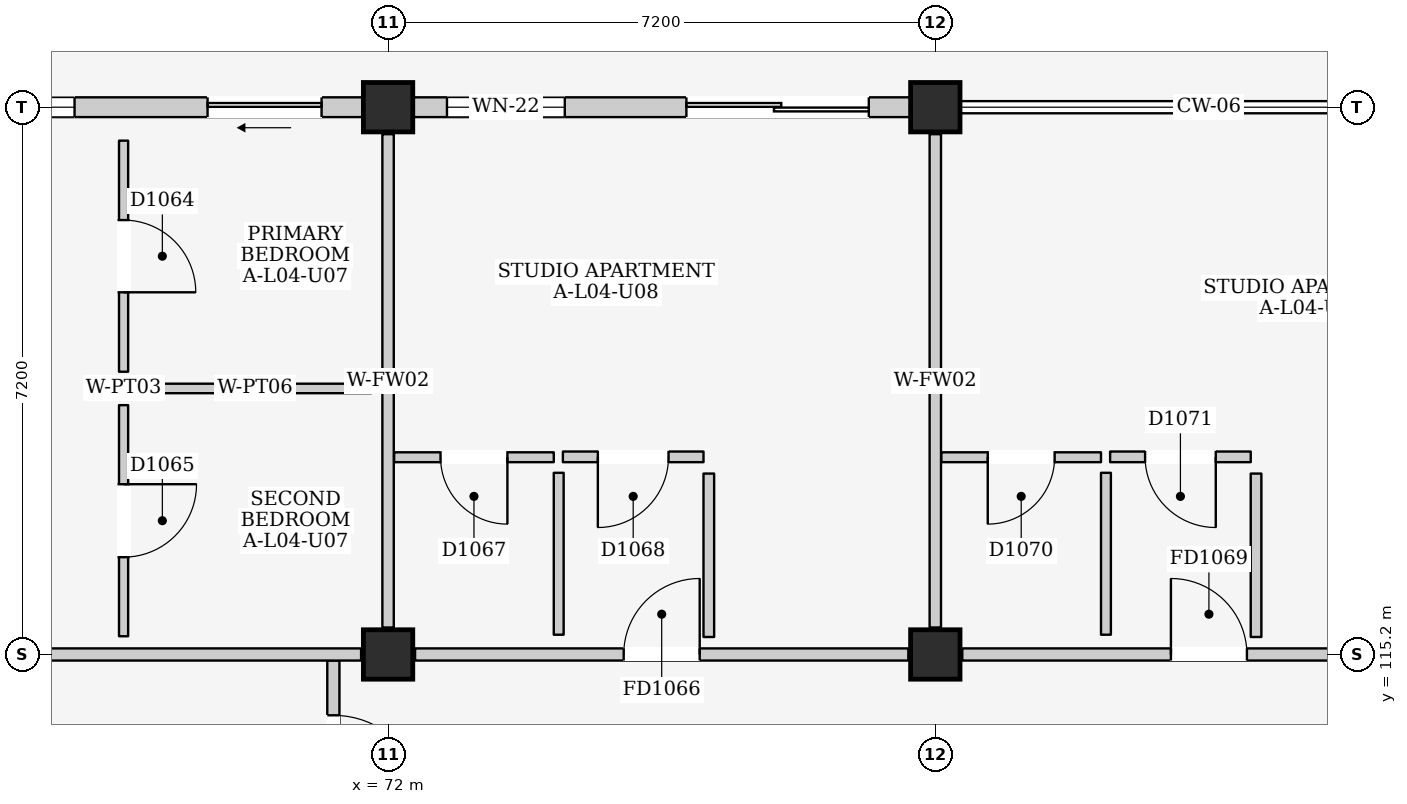
"""IFC4 building model, lengths in metres.
Left out: names, types, materials, properties, quantities, classifications, styles, units other than length and angle.
Written with IfcOpenShell. Run it as: python <this file> out.ifc"""

import sys

from ifc_helpers import new_model, si_unit, direction, frame, frame_2d, origin, origin_2d, place, context, subcontext, project, spatial, rectangle, extrude, element, fill, save


model = new_model("IFC4")
c1 = context("Model", 3, precision=1e-05, world=origin(), true_north=direction((0.0, 1.0)))
c2 = subcontext(c1, "Body", "Model", "MODEL_VIEW")
j1 = project(units=[si_unit("LENGTHUNIT", "METRE"), si_unit("PLANEANGLEUNIT", "RADIAN")], contexts=[c1])
p1 = place(None, origin())
s1 = spatial("IfcSite", under=j1, at=p1, CompositionType="ELEMENT")
p2 = place(p1, origin())
s2 = spatial("IfcBuilding", under=s1, at=p2, CompositionType="ELEMENT")
p3 = place(p2, frame((0.0, 0.0, 15.4)))
s3 = spatial("IfcBuildingStorey", under=s2, at=p3, CompositionType="ELEMENT", Elevation=15.4)
for number, where, z_axis, x_axis in (
    (1, (72.0, 115.2, 0.0), (0.0, 0.0, 1.0), (1.0, 0.0, 0.0)),
    (2, (72.0, 122.4, 0.0), (0.0, 0.0, 1.0), (1.0, 0.0, 0.0)),
    (3, (79.2, 115.2, 0.0), (0.0, 0.0, 1.0), (1.0, 0.0, 0.0)),
    (4, (79.2, 122.4, 0.0), (0.0, 0.0, 1.0), (1.0, 0.0, 0.0)),
):
    element("IfcColumn", number, at=place(p3, frame(where, z_axis=z_axis, x_axis=x_axis)), inside=s3, PredefinedType="COLUMN", context=c2, shape_type="SweptSolid", body=[
        extrude(rectangle(XDim=0.65, YDim=0.65, at=origin_2d()), origin(), (0.0, 0.0, 1.0), 3.2),
    ])
p4 = place(p3, frame((65.125, 122.4, 0.0), z_axis=(0.0, 0.0, 1.0), x_axis=(1.0, 0.0, 0.0)))
e5 = element("IfcWall", 5, at=p4, inside=s3, PredefinedType="ELEMENTEDWALL", context=c2, shape_type="SweptSolid", body=[
    extrude(rectangle(XDim=6.55, YDim=0.26, at=frame_2d((3.275, 0.0))), origin(), (0.0, 0.0, 1.0), 2.43),
])
p5 = place(p4, frame((4.5, 0.0, 0.0)))
e6 = element("IfcOpeningElement", 6, at=p5, cuts=e5, PredefinedType="OPENING", context=c2, shape_type="SweptSolid", body=[
    extrude(rectangle(XDim=1.5, YDim=2.12, at=frame_2d((0.75, 1.06))), frame((0.0, 0.145, 0.0), z_axis=(0.0, -1.0, 0.0), x_axis=(1.0, 0.0, 0.0)), (0.0, 0.0, 1.0), 0.29),
])
p6 = place(p4, frame((0.45, 0.0, 0.71)))
e7 = element("IfcOpeningElement", 7, at=p6, cuts=e5, PredefinedType="OPENING", context=c2, shape_type="SweptSolid", body=[
    extrude(rectangle(XDim=2.3, YDim=1.6, at=frame_2d((1.15, 0.8))), frame((0.0, 0.145, 0.0), z_axis=(0.0, -1.0, 0.0), x_axis=(1.0, 0.0, 0.0)), (0.0, 0.0, 1.0), 0.29),
])
p7 = place(p3, frame((72.325, 122.4, 0.0), z_axis=(0.0, 0.0, 1.0), x_axis=(1.0, 0.0, 0.0)))
e8 = element("IfcWall", 8, at=p7, inside=s3, PredefinedType="ELEMENTEDWALL", context=c2, shape_type="SweptSolid", body=[
    extrude(rectangle(XDim=6.55, YDim=0.26, at=frame_2d((3.275, 0.0))), origin(), (0.0, 0.0, 1.0), 2.43),
])
p8 = place(p7, frame((3.6, 0.0, 0.0)))
e9 = element("IfcOpeningElement", 9, at=p8, cuts=e8, PredefinedType="OPENING", context=c2, shape_type="SweptSolid", body=[
    extrude(rectangle(XDim=2.4, YDim=2.12, at=frame_2d((1.2, 1.06))), frame((0.0, 0.145, 0.0), z_axis=(0.0, -1.0, 0.0), x_axis=(1.0, 0.0, 0.0)), (0.0, 0.0, 1.0), 0.29),
])
p9 = place(p7, frame((0.45, 0.0, 0.86)))
e10 = element("IfcOpeningElement", 10, at=p9, cuts=e8, PredefinedType="OPENING", context=c2, shape_type="SweptSolid", body=[
    extrude(rectangle(XDim=1.55, YDim=1.45, at=frame_2d((0.775, 0.725))), frame((0.0, 0.145, 0.0), z_axis=(0.0, -1.0, 0.0), x_axis=(1.0, 0.0, 0.0)), (0.0, 0.0, 1.0), 0.29),
])
p10 = place(p3, frame((71.28, 110.8, 0.0), z_axis=(0.0, 0.0, 1.0), x_axis=(0.0, 1.0, 0.0)))
e11 = element("IfcWall", 11, at=p10, inside=s3, PredefinedType="PARTITIONING", context=c2, shape_type="SweptSolid", body=[
    extrude(rectangle(XDim=4.32, YDim=0.16, at=frame_2d((2.16, 0.0))), origin(), (0.0, 0.0, 1.0), 2.95),
])
p11 = place(p10, frame((2.4, 0.0, 0.0)))
e12 = element("IfcOpeningElement", 12, at=p11, cuts=e11, PredefinedType="OPENING", context=c2, shape_type="SweptSolid", body=[
    extrude(rectangle(XDim=1.2, YDim=2.2, at=frame_2d((0.6, 1.1))), frame((0.0, 0.095, 0.0), z_axis=(0.0, -1.0, 0.0), x_axis=(1.0, 0.0, 0.0)), (0.0, 0.0, 1.0), 0.19),
])
p12 = place(p3, frame((65.155, 115.2, 0.0), z_axis=(0.0, 0.0, 1.0), x_axis=(1.0, 0.0, 0.0)))
e13 = element("IfcWall", 13, at=p12, inside=s3, PredefinedType="PARTITIONING", context=c2, shape_type="SweptSolid", body=[
    extrude(rectangle(XDim=6.49, YDim=0.16, at=frame_2d((3.245, 0.0))), origin(), (0.0, 0.0, 1.0), 2.285),
])
p13 = place(p3, frame((72.0, 115.555, 0.0), z_axis=(0.0, 0.0, 1.0), x_axis=(0.0, 1.0, 0.0)))
e14 = element("IfcWall", 14, at=p13, inside=s3, PredefinedType="PARTITIONING", context=c2, shape_type="SweptSolid", body=[
    extrude(rectangle(XDim=6.49, YDim=0.15, at=frame_2d((3.245, 0.0))), origin(), (0.0, 0.0, 1.0), 2.385),
])
p14 = place(p3, frame((68.52, 118.92, 0.0), z_axis=(0.0, 0.0, 1.0), x_axis=(0.0, 1.0, 0.0)))
e15 = element("IfcWall", 15, at=p14, inside=s3, PredefinedType="PARTITIONING", context=c2, shape_type="SweptSolid", body=[
    extrude(rectangle(XDim=3.04, YDim=0.12, at=frame_2d((1.52, 0.0))), origin(), (0.0, 0.0, 1.0), 2.95),
])
p15 = place(p14, frame((1.045, 0.0, 0.0)))
e16 = element("IfcOpeningElement", 16, at=p15, cuts=e15, PredefinedType="OPENING", context=c2, shape_type="SweptSolid", body=[
    extrude(rectangle(XDim=0.95, YDim=2.15, at=frame_2d((0.475, 1.075))), frame((0.0, 0.075, 0.0), z_axis=(0.0, -1.0, 0.0), x_axis=(1.0, 0.0, 0.0)), (0.0, 0.0, 1.0), 0.15),
])
p16 = place(p3, frame((68.72, 118.7, 0.0), z_axis=(0.0, 0.0, 1.0), x_axis=(1.0, 0.0, 0.0)))
e17 = element("IfcWall", 17, at=p16, inside=s3, PredefinedType="PARTITIONING", context=c2, shape_type="SweptSolid", body=[
    extrude(rectangle(XDim=3.06, YDim=0.125, at=frame_2d((1.53, 0.0))), origin(), (0.0, 0.0, 1.0), 2.95),
])
p17 = place(p3, frame((68.52, 115.44, 0.0), z_axis=(0.0, 0.0, 1.0), x_axis=(0.0, 1.0, 0.0)))
e18 = element("IfcWall", 18, at=p17, inside=s3, PredefinedType="PARTITIONING", context=c2, shape_type="SweptSolid", body=[
    extrude(rectangle(XDim=3.04, YDim=0.12, at=frame_2d((1.52, 0.0))), origin(), (0.0, 0.0, 1.0), 2.95),
])
p18 = place(p17, frame((1.04, 0.0, 0.0)))
e19 = element("IfcOpeningElement", 19, at=p18, cuts=e18, PredefinedType="OPENING", context=c2, shape_type="SweptSolid", body=[
    extrude(rectangle(XDim=0.96, YDim=2.15, at=frame_2d((0.48, 1.075))), frame((0.0, 0.075, 0.0), z_axis=(0.0, -1.0, 0.0), x_axis=(1.0, 0.0, 0.0)), (0.0, 0.0, 1.0), 0.15),
])
p19 = place(p3, frame((72.355, 115.2, 0.0), z_axis=(0.0, 0.0, 1.0), x_axis=(1.0, 0.0, 0.0)))
e20 = element("IfcWall", 20, at=p19, inside=s3, PredefinedType="PARTITIONING", context=c2, shape_type="SweptSolid", body=[
    extrude(rectangle(XDim=6.49, YDim=0.16, at=frame_2d((3.245, 0.0))), origin(), (0.0, 0.0, 1.0), 2.285),
])
p20 = place(p19, frame((2.745, 0.0, 0.0)))
e21 = element("IfcOpeningElement", 21, at=p20, cuts=e20, PredefinedType="OPENING", context=c2, shape_type="SweptSolid", body=[
    extrude(rectangle(XDim=1.0, YDim=2.15, at=frame_2d((0.5, 1.075))), frame((0.0, 0.095, 0.0), z_axis=(0.0, -1.0, 0.0), x_axis=(1.0, 0.0, 0.0)), (0.0, 0.0, 1.0), 0.19),
])
p21 = place(p3, frame((79.2, 115.555, 0.0), z_axis=(0.0, 0.0, 1.0), x_axis=(0.0, 1.0, 0.0)))
e22 = element("IfcWall", 22, at=p21, inside=s3, PredefinedType="PARTITIONING", context=c2, shape_type="SweptSolid", body=[
    extrude(rectangle(XDim=6.49, YDim=0.15, at=frame_2d((3.245, 0.0))), origin(), (0.0, 0.0, 1.0), 2.385),
])
p22 = place(p3, frame((72.08, 117.795, 0.0), z_axis=(0.0, 0.0, 1.0), x_axis=(1.0, 0.0, 0.0)))
e23 = element("IfcWall", 23, at=p22, inside=s3, PredefinedType="PARTITIONING", context=c2, shape_type="SweptSolid", body=[
    extrude(rectangle(XDim=2.1, YDim=0.13, at=frame_2d((1.05, 0.0))), origin(), (0.0, 0.0, 1.0), 2.95),
])
p23 = place(p22, frame((0.61, 0.0, 0.0)))
e24 = element("IfcOpeningElement", 24, at=p23, cuts=e23, PredefinedType="OPENING", context=c2, shape_type="SweptSolid", body=[
    extrude(rectangle(XDim=0.88, YDim=2.1, at=frame_2d((0.44, 1.05))), frame((0.0, 0.08, 0.0), z_axis=(0.0, -1.0, 0.0), x_axis=(1.0, 0.0, 0.0)), (0.0, 0.0, 1.0), 0.16),
])
p24 = place(p3, frame((74.245, 115.46, 0.0), z_axis=(0.0, 0.0, 1.0), x_axis=(0.0, 1.0, 0.0)))
e25 = element("IfcWall", 25, at=p24, inside=s3, PredefinedType="PARTITIONING", context=c2, shape_type="SweptSolid", body=[
    extrude(rectangle(XDim=2.13, YDim=0.13, at=frame_2d((1.065, 0.0))), origin(), (0.0, 0.0, 1.0), 2.95),
])
p25 = place(p3, frame((74.3, 117.8, 0.0), z_axis=(0.0, 0.0, 1.0), x_axis=(1.0, 0.0, 0.0)))
e26 = element("IfcWall", 26, at=p25, inside=s3, PredefinedType="PARTITIONING", context=c2, shape_type="SweptSolid", body=[
    extrude(rectangle(XDim=1.85, YDim=0.14, at=frame_2d((0.925, 0.0))), origin(), (0.0, 0.0, 1.0), 2.95),
])
p26 = place(p25, frame((0.46, 0.0, 0.0)))
e27 = element("IfcOpeningElement", 27, at=p26, cuts=e26, PredefinedType="OPENING", context=c2, shape_type="SweptSolid", body=[
    extrude(rectangle(XDim=0.93, YDim=2.14, at=frame_2d((0.465, 1.07))), frame((0.0, 0.085, 0.0), z_axis=(0.0, -1.0, 0.0), x_axis=(1.0, 0.0, 0.0)), (0.0, 0.0, 1.0), 0.17),
])
p27 = place(p3, frame((76.22, 115.43, 0.0), z_axis=(0.0, 0.0, 1.0), x_axis=(0.0, 1.0, 0.0)))
e28 = element("IfcWall", 28, at=p27, inside=s3, PredefinedType="PARTITIONING", context=c2, shape_type="SweptSolid", body=[
    extrude(rectangle(XDim=2.15, YDim=0.14, at=frame_2d((1.075, 0.0))), origin(), (0.0, 0.0, 1.0), 2.95),
])
p28 = place(p3, frame((79.555, 115.2, 0.0), z_axis=(0.0, 0.0, 1.0), x_axis=(1.0, 0.0, 0.0)))
e29 = element("IfcWall", 29, at=p28, inside=s3, PredefinedType="PARTITIONING", context=c2, shape_type="SweptSolid", body=[
    extrude(rectangle(XDim=6.49, YDim=0.16, at=frame_2d((3.245, 0.0))), origin(), (0.0, 0.0, 1.0), 2.285),
])
p29 = place(p28, frame((2.745, 0.0, 0.0)))
e30 = element("IfcOpeningElement", 30, at=p29, cuts=e29, PredefinedType="OPENING", context=c2, shape_type="SweptSolid", body=[
    extrude(rectangle(XDim=1.0, YDim=2.15, at=frame_2d((0.5, 1.075))), frame((0.0, 0.095, 0.0), z_axis=(0.0, -1.0, 0.0), x_axis=(1.0, 0.0, 0.0)), (0.0, 0.0, 1.0), 0.19),
])
p30 = place(p3, frame((79.28, 117.795, 0.0), z_axis=(0.0, 0.0, 1.0), x_axis=(1.0, 0.0, 0.0)))
e31 = element("IfcWall", 31, at=p30, inside=s3, PredefinedType="PARTITIONING", context=c2, shape_type="SweptSolid", body=[
    extrude(rectangle(XDim=2.1, YDim=0.13, at=frame_2d((1.05, 0.0))), origin(), (0.0, 0.0, 1.0), 2.95),
])
p31 = place(p30, frame((0.61, 0.0, 0.0)))
e32 = element("IfcOpeningElement", 32, at=p31, cuts=e31, PredefinedType="OPENING", context=c2, shape_type="SweptSolid", body=[
    extrude(rectangle(XDim=0.88, YDim=2.1, at=frame_2d((0.44, 1.05))), frame((0.0, 0.08, 0.0), z_axis=(0.0, -1.0, 0.0), x_axis=(1.0, 0.0, 0.0)), (0.0, 0.0, 1.0), 0.16),
])
p32 = place(p3, frame((81.445, 115.46, 0.0), z_axis=(0.0, 0.0, 1.0), x_axis=(0.0, 1.0, 0.0)))
e33 = element("IfcWall", 33, at=p32, inside=s3, PredefinedType="PARTITIONING", context=c2, shape_type="SweptSolid", body=[
    extrude(rectangle(XDim=2.13, YDim=0.13, at=frame_2d((1.065, 0.0))), origin(), (0.0, 0.0, 1.0), 2.95),
])
p33 = place(p3, frame((81.5, 117.8, 0.0), z_axis=(0.0, 0.0, 1.0), x_axis=(1.0, 0.0, 0.0)))
e34 = element("IfcWall", 34, at=p33, inside=s3, PredefinedType="PARTITIONING", context=c2, shape_type="SweptSolid", body=[
    extrude(rectangle(XDim=1.85, YDim=0.14, at=frame_2d((0.925, 0.0))), origin(), (0.0, 0.0, 1.0), 2.95),
])
p34 = place(p33, frame((0.46, 0.0, 0.0)))
e35 = element("IfcOpeningElement", 35, at=p34, cuts=e34, PredefinedType="OPENING", context=c2, shape_type="SweptSolid", body=[
    extrude(rectangle(XDim=0.93, YDim=2.14, at=frame_2d((0.465, 1.07))), frame((0.0, 0.085, 0.0), z_axis=(0.0, -1.0, 0.0), x_axis=(1.0, 0.0, 0.0)), (0.0, 0.0, 1.0), 0.17),
])
p35 = place(p3, frame((83.42, 115.43, 0.0), z_axis=(0.0, 0.0, 1.0), x_axis=(0.0, 1.0, 0.0)))
e36 = element("IfcWall", 36, at=p35, inside=s3, PredefinedType="PARTITIONING", context=c2, shape_type="SweptSolid", body=[
    extrude(rectangle(XDim=2.15, YDim=0.14, at=frame_2d((1.075, 0.0))), origin(), (0.0, 0.0, 1.0), 2.95),
])
p36 = place(p5, frame((1.5, 0.0, 0.0), z_axis=(0.0, 0.0, 1.0), x_axis=(-1.0, 0.0, 0.0)))
e37 = element("IfcDoor", 37, at=p36, inside=s3, OperationType="SLIDING_TO_LEFT", PredefinedType="DOOR", context=c2, shape_type="SweptSolid", body=[
    extrude(rectangle(XDim=1.5, YDim=2.12, at=frame_2d((0.75, 1.06))), frame((0.0, 0.025, 0.0), z_axis=(0.0, -1.0, 0.0), x_axis=(1.0, 0.0, 0.0)), (0.0, 0.0, 1.0), 0.05),
])
fill(e6, e37)
p37 = place(p6, origin())
e38 = element("IfcWindow", 38, at=p37, inside=s3, PartitioningType="TRIPLE_PANEL_VERTICAL", PredefinedType="WINDOW", context=c2, shape_type="SweptSolid", body=[
    extrude(rectangle(XDim=2.3, YDim=1.6, at=frame_2d((1.15, 0.8))), frame((0.0, 0.03, 0.0), z_axis=(0.0, -1.0, 0.0), x_axis=(1.0, 0.0, 0.0)), (0.0, 0.0, 1.0), 0.06),
])
fill(e7, e38)
p38 = place(p8, frame((2.4, 0.0, 0.0), z_axis=(0.0, 0.0, 1.0), x_axis=(-1.0, 0.0, 0.0)))
e39 = element("IfcDoor", 39, at=p38, inside=s3, OperationType="DOUBLE_DOOR_SLIDING", PredefinedType="DOOR", context=c2, shape_type="SweptSolid", body=[
    extrude(rectangle(XDim=2.4, YDim=2.12, at=frame_2d((1.2, 1.06))), frame((0.0, 0.025, 0.0), z_axis=(0.0, -1.0, 0.0), x_axis=(1.0, 0.0, 0.0)), (0.0, 0.0, 1.0), 0.05),
])
fill(e9, e39)
p39 = place(p9, origin())
e40 = element("IfcWindow", 40, at=p39, inside=s3, PartitioningType="DOUBLE_PANEL_VERTICAL", PredefinedType="WINDOW", context=c2, shape_type="SweptSolid", body=[
    extrude(rectangle(XDim=1.55, YDim=1.45, at=frame_2d((0.775, 0.725))), frame((0.0, 0.03, 0.0), z_axis=(0.0, -1.0, 0.0), x_axis=(1.0, 0.0, 0.0)), (0.0, 0.0, 1.0), 0.06),
])
fill(e10, e40)
p40 = place(p11, frame((1.2, 0.0, 0.0), z_axis=(0.0, 0.0, 1.0), x_axis=(-1.0, 0.0, 0.0)))
e41 = element("IfcDoor", 41, at=p40, inside=s3, OperationType="SINGLE_SWING_RIGHT", PredefinedType="DOOR", context=c2, shape_type="SweptSolid", body=[
    extrude(rectangle(XDim=1.2, YDim=2.2, at=frame_2d((0.6, 1.1))), frame((0.0, 0.025, 0.0), z_axis=(0.0, -1.0, 0.0), x_axis=(1.0, 0.0, 0.0)), (0.0, 0.0, 1.0), 0.05),
])
fill(e12, e41)
p41 = place(p15, frame((0.95, 0.0, 0.0), z_axis=(0.0, 0.0, 1.0), x_axis=(-1.0, 0.0, 0.0)))
e42 = element("IfcDoor", 42, at=p41, inside=s3, OperationType="SINGLE_SWING_RIGHT", PredefinedType="DOOR", context=c2, shape_type="SweptSolid", body=[
    extrude(rectangle(XDim=0.95, YDim=2.15, at=frame_2d((0.475, 1.075))), frame((0.0, 0.025, 0.0), z_axis=(0.0, -1.0, 0.0), x_axis=(1.0, 0.0, 0.0)), (0.0, 0.0, 1.0), 0.05),
])
fill(e16, e42)
p42 = place(p18, frame((0.96, 0.0, 0.0), z_axis=(0.0, 0.0, 1.0), x_axis=(-1.0, 0.0, 0.0)))
e43 = element("IfcDoor", 43, at=p42, inside=s3, OperationType="SINGLE_SWING_LEFT", PredefinedType="DOOR", context=c2, shape_type="SweptSolid", body=[
    extrude(rectangle(XDim=0.96, YDim=2.15, at=frame_2d((0.48, 1.075))), frame((0.0, 0.025, 0.0), z_axis=(0.0, -1.0, 0.0), x_axis=(1.0, 0.0, 0.0)), (0.0, 0.0, 1.0), 0.05),
])
fill(e19, e43)
p43 = place(p20, origin())
e44 = element("IfcDoor", 44, at=p43, inside=s3, OperationType="SINGLE_SWING_RIGHT", PredefinedType="DOOR", context=c2, shape_type="SweptSolid", body=[
    extrude(rectangle(XDim=1.0, YDim=2.15, at=frame_2d((0.5, 1.075))), frame((0.0, 0.025, 0.0), z_axis=(0.0, -1.0, 0.0), x_axis=(1.0, 0.0, 0.0)), (0.0, 0.0, 1.0), 0.05),
])
fill(e21, e44)
p44 = place(p23, frame((0.88, 0.0, 0.0), z_axis=(0.0, 0.0, 1.0), x_axis=(-1.0, 0.0, 0.0)))
e45 = element("IfcDoor", 45, at=p44, inside=s3, OperationType="SINGLE_SWING_LEFT", PredefinedType="DOOR", context=c2, shape_type="SweptSolid", body=[
    extrude(rectangle(XDim=0.88, YDim=2.1, at=frame_2d((0.44, 1.05))), frame((0.0, 0.025, 0.0), z_axis=(0.0, -1.0, 0.0), x_axis=(1.0, 0.0, 0.0)), (0.0, 0.0, 1.0), 0.05),
])
fill(e24, e45)
p45 = place(p26, frame((0.93, 0.0, 0.0), z_axis=(0.0, 0.0, 1.0), x_axis=(-1.0, 0.0, 0.0)))
e46 = element("IfcDoor", 46, at=p45, inside=s3, OperationType="SINGLE_SWING_RIGHT", PredefinedType="DOOR", context=c2, shape_type="SweptSolid", body=[
    extrude(rectangle(XDim=0.93, YDim=2.14, at=frame_2d((0.465, 1.07))), frame((0.0, 0.025, 0.0), z_axis=(0.0, -1.0, 0.0), x_axis=(1.0, 0.0, 0.0)), (0.0, 0.0, 1.0), 0.05),
])
fill(e27, e46)
p46 = place(p29, origin())
e47 = element("IfcDoor", 47, at=p46, inside=s3, OperationType="SINGLE_SWING_LEFT", PredefinedType="DOOR", context=c2, shape_type="SweptSolid", body=[
    extrude(rectangle(XDim=1.0, YDim=2.15, at=frame_2d((0.5, 1.075))), frame((0.0, 0.025, 0.0), z_axis=(0.0, -1.0, 0.0), x_axis=(1.0, 0.0, 0.0)), (0.0, 0.0, 1.0), 0.05),
])
fill(e30, e47)
p47 = place(p31, frame((0.88, 0.0, 0.0), z_axis=(0.0, 0.0, 1.0), x_axis=(-1.0, 0.0, 0.0)))
e48 = element("IfcDoor", 48, at=p47, inside=s3, OperationType="SINGLE_SWING_RIGHT", PredefinedType="DOOR", context=c2, shape_type="SweptSolid", body=[
    extrude(rectangle(XDim=0.88, YDim=2.1, at=frame_2d((0.44, 1.05))), frame((0.0, 0.025, 0.0), z_axis=(0.0, -1.0, 0.0), x_axis=(1.0, 0.0, 0.0)), (0.0, 0.0, 1.0), 0.05),
])
fill(e32, e48)
p48 = place(p34, frame((0.93, 0.0, 0.0), z_axis=(0.0, 0.0, 1.0), x_axis=(-1.0, 0.0, 0.0)))
e49 = element("IfcDoor", 49, at=p48, inside=s3, OperationType="SINGLE_SWING_LEFT", PredefinedType="DOOR", context=c2, shape_type="SweptSolid", body=[
    extrude(rectangle(XDim=0.93, YDim=2.14, at=frame_2d((0.465, 1.07))), frame((0.0, 0.025, 0.0), z_axis=(0.0, -1.0, 0.0), x_axis=(1.0, 0.0, 0.0)), (0.0, 0.0, 1.0), 0.05),
])
fill(e35, e49)
save(model, sys.argv[1])
